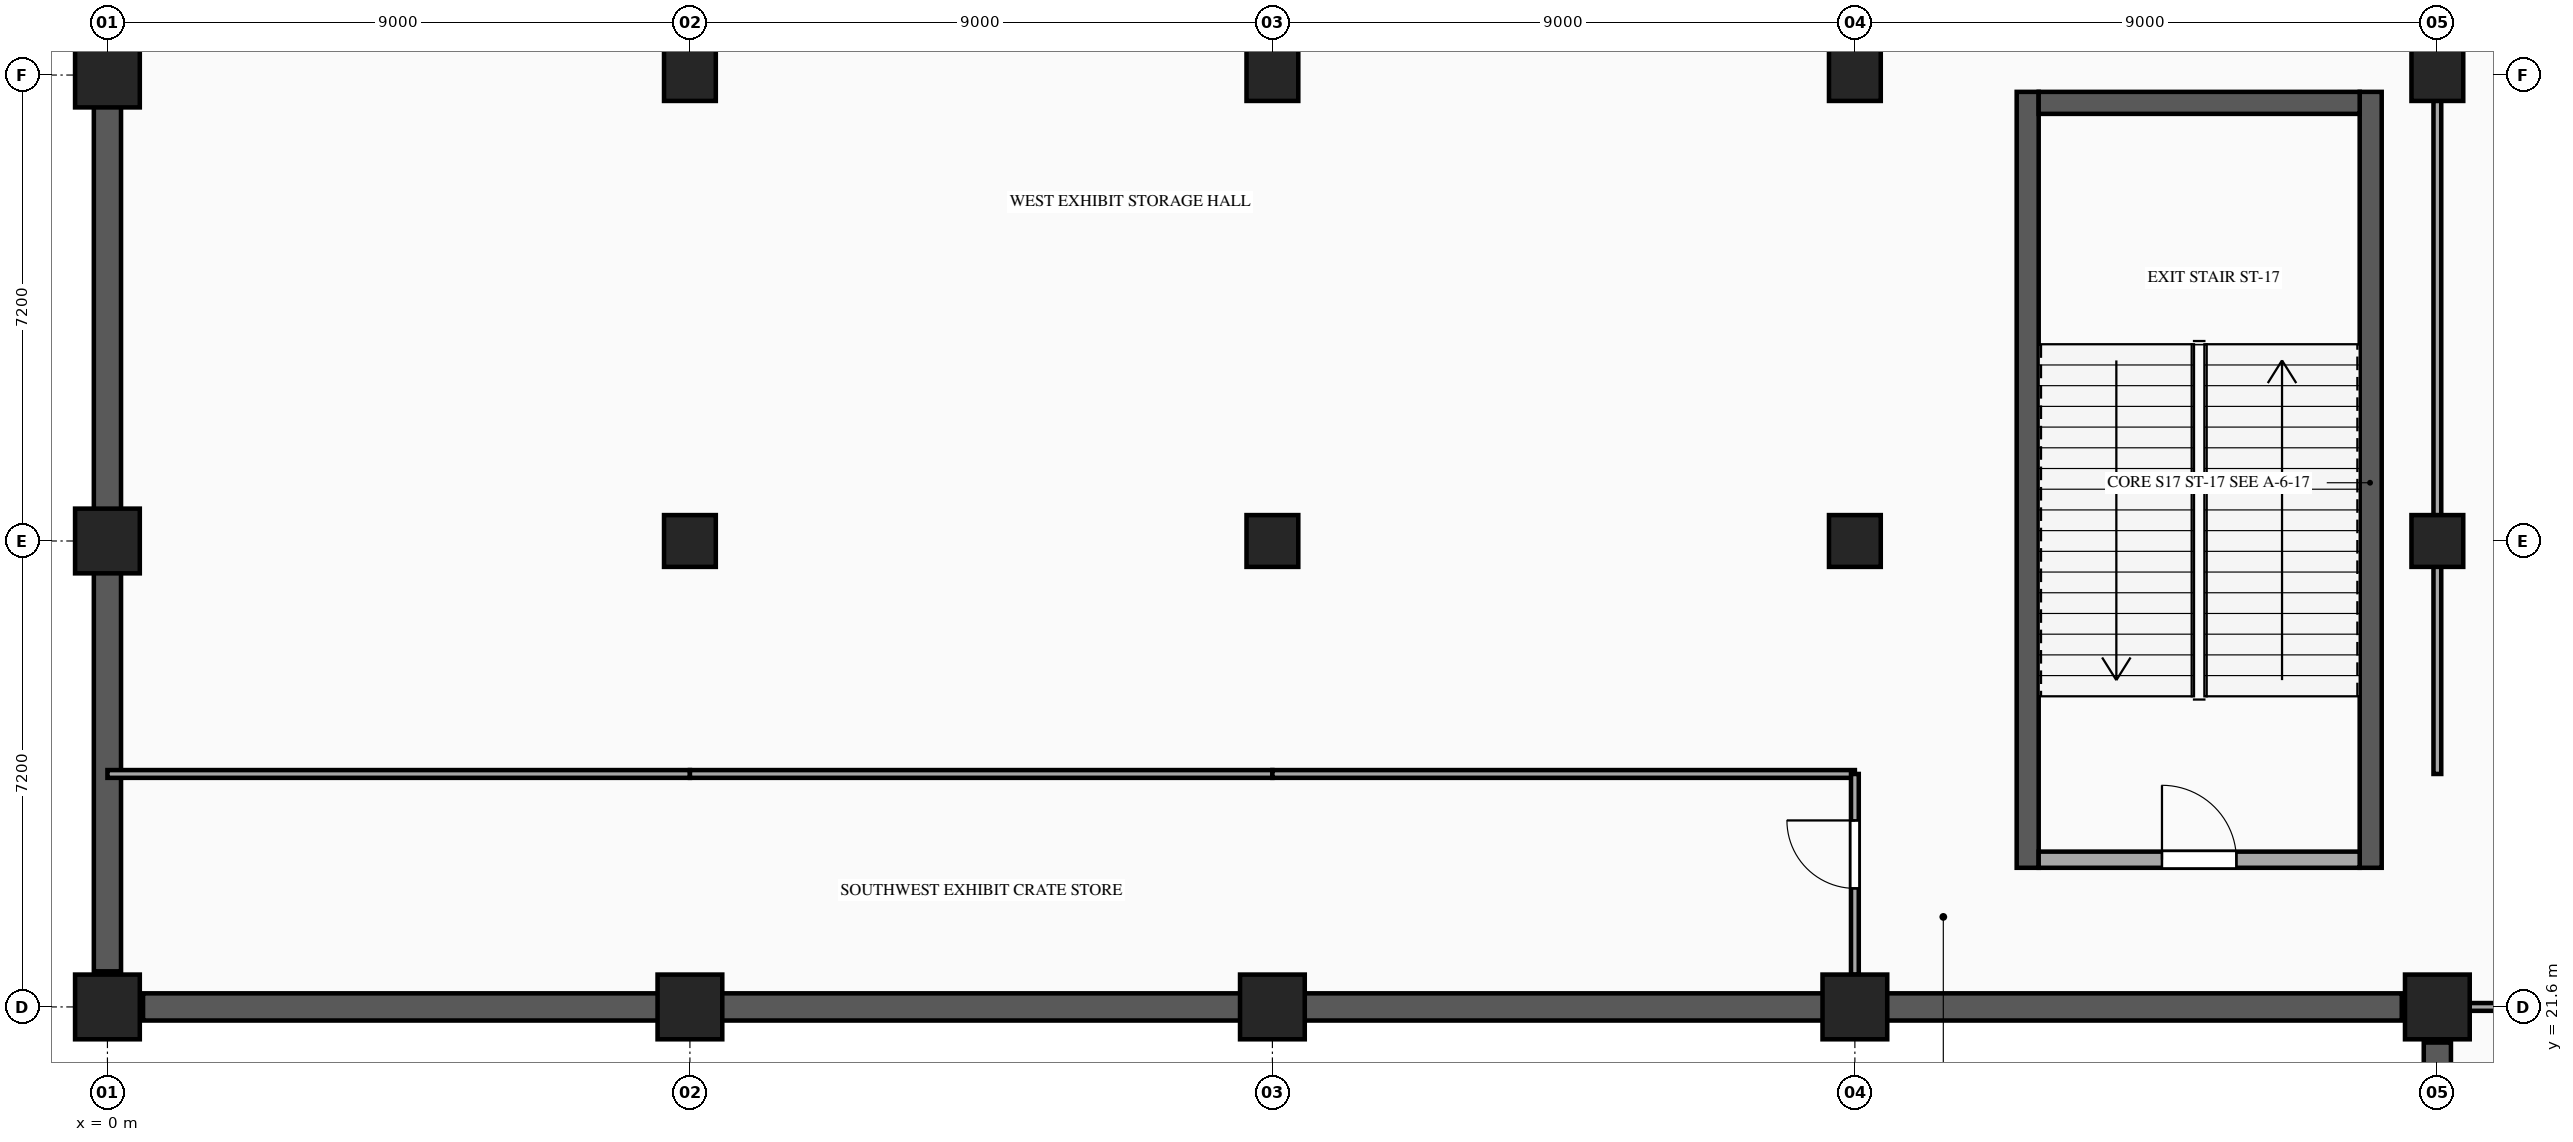
"""IFC4 building model, lengths in metres.
Left out: names, types, materials, properties, quantities, classifications, styles, units other than length and angle.
Written with IfcOpenShell. Run it as: python <this file> out.ifc"""

import sys

from ifc_helpers import new_model, si_unit, direction, frame, frame_2d, origin, origin_2d, place, context, subcontext, project, spatial, rectangle, extrude, element, fill, save


model = new_model("IFC4")
c1 = context("Model", 3, precision=1e-05, world=origin(), true_north=direction((0.0, 1.0)))
c2 = subcontext(c1, "Body", "Model", "MODEL_VIEW")
j1 = project(units=[si_unit("LENGTHUNIT", "METRE"), si_unit("PLANEANGLEUNIT", "RADIAN")], contexts=[c1])
p1 = place(None, origin())
s1 = spatial("IfcSite", under=j1, at=p1, CompositionType="ELEMENT")
p2 = place(p1, origin())
s2 = spatial("IfcBuilding", under=s1, at=p2, CompositionType="ELEMENT")
p3 = place(p2, frame((0.0, 0.0, -5.4)))
s3 = spatial("IfcBuildingStorey", under=s2, at=p3, CompositionType="ELEMENT", Elevation=-5.4)
for number, where, z_axis, x_axis in (
    (1, (0.0, 21.6, 0.0), (0.0, 0.0, 1.0), (1.0, 0.0, 0.0)),
    (2, (0.0, 28.8, 0.0), (0.0, 0.0, 1.0), (1.0, 0.0, 0.0)),
    (3, (0.0, 36.0, 0.0), (0.0, 0.0, 1.0), (1.0, 0.0, 0.0)),
    (4, (9.0, 21.6, 0.0), (0.0, 0.0, 1.0), (1.0, 0.0, 0.0)),
):
    element("IfcColumn", number, at=place(p3, frame(where, z_axis=z_axis, x_axis=x_axis)), inside=s3, PredefinedType="COLUMN", context=c2, shape_type="SweptSolid", body=[
        extrude(rectangle(XDim=1.0, YDim=1.0, at=origin_2d()), origin(), (0.0, 0.0, 1.0), 5.4),
    ])
for number, where, z_axis, x_axis in (
    (5, (9.0, 28.8, 0.0), (0.0, 0.0, 1.0), (1.0, 0.0, 0.0)),
    (6, (9.0, 36.0, 0.0), (0.0, 0.0, 1.0), (1.0, 0.0, 0.0)),
):
    element("IfcColumn", number, at=place(p3, frame(where, z_axis=z_axis, x_axis=x_axis)), inside=s3, PredefinedType="COLUMN", context=c2, shape_type="SweptSolid", body=[
        extrude(rectangle(XDim=0.8, YDim=0.8, at=origin_2d()), origin(), (0.0, 0.0, 1.0), 5.4),
    ])
p4 = place(p3, frame((18.0, 21.6, 0.0), z_axis=(0.0, 0.0, 1.0), x_axis=(1.0, 0.0, 0.0)))
e7 = element("IfcColumn", 7, at=p4, inside=s3, PredefinedType="COLUMN", context=c2, shape_type="SweptSolid", body=[
    extrude(rectangle(XDim=1.0, YDim=1.0, at=origin_2d()), origin(), (0.0, 0.0, 1.0), 5.4),
])
for number, where, z_axis, x_axis in (
    (8, (18.0, 28.8, 0.0), (0.0, 0.0, 1.0), (1.0, 0.0, 0.0)),
    (9, (18.0, 36.0, 0.0), (0.0, 0.0, 1.0), (1.0, 0.0, 0.0)),
):
    element("IfcColumn", number, at=place(p3, frame(where, z_axis=z_axis, x_axis=x_axis)), inside=s3, PredefinedType="COLUMN", context=c2, shape_type="SweptSolid", body=[
        extrude(rectangle(XDim=0.8, YDim=0.8, at=origin_2d()), origin(), (0.0, 0.0, 1.0), 5.4),
    ])
p5 = place(p3, frame((27.0, 21.6, 0.0), z_axis=(0.0, 0.0, 1.0), x_axis=(1.0, 0.0, 0.0)))
e10 = element("IfcColumn", 10, at=p5, inside=s3, PredefinedType="COLUMN", context=c2, shape_type="SweptSolid", body=[
    extrude(rectangle(XDim=1.0, YDim=1.0, at=origin_2d()), origin(), (0.0, 0.0, 1.0), 5.4),
])
for number, where, z_axis, x_axis in (
    (11, (27.0, 28.8, 0.0), (0.0, 0.0, 1.0), (1.0, 0.0, 0.0)),
    (12, (27.0, 36.0, 0.0), (0.0, 0.0, 1.0), (1.0, 0.0, 0.0)),
):
    element("IfcColumn", number, at=place(p3, frame(where, z_axis=z_axis, x_axis=x_axis)), inside=s3, PredefinedType="COLUMN", context=c2, shape_type="SweptSolid", body=[
        extrude(rectangle(XDim=0.8, YDim=0.8, at=origin_2d()), origin(), (0.0, 0.0, 1.0), 5.4),
    ])
p6 = place(p3, frame((36.0, 21.6, 0.0), z_axis=(0.0, 0.0, 1.0), x_axis=(1.0, 0.0, 0.0)))
e13 = element("IfcColumn", 13, at=p6, inside=s3, PredefinedType="COLUMN", context=c2, shape_type="SweptSolid", body=[
    extrude(rectangle(XDim=1.0, YDim=1.0, at=origin_2d()), origin(), (0.0, 0.0, 1.0), 5.4),
])
for number, where, z_axis, x_axis in (
    (14, (36.0, 28.8, 0.0), (0.0, 0.0, 1.0), (1.0, 0.0, 0.0)),
    (15, (36.0, 36.0, 0.0), (0.0, 0.0, 1.0), (1.0, 0.0, 0.0)),
):
    element("IfcColumn", number, at=place(p3, frame(where, z_axis=z_axis, x_axis=x_axis)), inside=s3, PredefinedType="COLUMN", context=c2, shape_type="SweptSolid", body=[
        extrude(rectangle(XDim=0.8, YDim=0.8, at=origin_2d()), origin(), (0.0, 0.0, 1.0), 5.4),
    ])
p7 = place(p3, frame((0.0, 22.15, 0.0), z_axis=(0.0, 0.0, 1.0), x_axis=(0.0, 1.0, 0.0)))
e16 = element("IfcWall", 16, at=p7, inside=s3, PredefinedType="USERDEFINED", context=c2, shape_type="SweptSolid", body=[
    extrude(rectangle(XDim=85.3, YDim=0.42, at=frame_2d((42.65, 0.0))), origin(), (0.0, 0.0, 1.0), 4.08),
])
p8 = place(p3, frame((36.0, 0.55, 0.0), z_axis=(0.0, 0.0, 1.0), x_axis=(0.0, 1.0, 0.0)))
e17 = element("IfcWall", 17, at=p8, inside=s3, PredefinedType="USERDEFINED", context=c2, shape_type="SweptSolid", body=[
    extrude(rectangle(XDim=20.5, YDim=0.42, at=frame_2d((10.25, 0.0))), origin(), (0.0, 0.0, 1.0), 4.08),
])
p9 = place(p3, frame((35.45, 21.6, 0.0), z_axis=(0.0, 0.0, 1.0), x_axis=(-1.0, 0.0, 0.0)))
e18 = element("IfcWall", 18, at=p9, inside=s3, PredefinedType="USERDEFINED", context=c2, shape_type="SweptSolid", body=[
    extrude(rectangle(XDim=34.9, YDim=0.42, at=frame_2d((17.45, 0.0))), origin(), (0.0, 0.0, 1.0), 4.08),
])
for number, where, z_axis, x_axis in (
    (19, (29.67, 23.75, 0.0), (0.0, 0.0, 1.0), (0.0, 1.0, 0.0)),
    (20, (34.97, 35.74, 0.0), (0.0, 0.0, 1.0), (0.0, -1.0, 0.0)),
):
    element("IfcWall", number, at=place(p3, frame(where, z_axis=z_axis, x_axis=x_axis)), inside=s3, PredefinedType="SHEAR", context=c2, shape_type="SweptSolid", body=[
        extrude(rectangle(XDim=11.99, YDim=0.34, at=frame_2d((5.995, 0.0))), origin(), (0.0, 0.0, 1.0), 5.04),
    ])
p10 = place(p3, frame((29.84, 35.57, 0.0), z_axis=(0.0, 0.0, 1.0), x_axis=(1.0, 0.0, 0.0)))
e21 = element("IfcWall", 21, at=p10, inside=s3, PredefinedType="SHEAR", context=c2, shape_type="SweptSolid", body=[
    extrude(rectangle(XDim=4.96, YDim=0.34, at=frame_2d((2.48, 0.0))), origin(), (0.0, 0.0, 1.0), 5.04),
])
p11 = place(p3, frame((29.84, 23.875, 0.0), z_axis=(0.0, 0.0, 1.0), x_axis=(1.0, 0.0, 0.0)))
e22 = element("IfcWall", 22, at=p11, inside=s3, PredefinedType="STANDARD", context=c2, shape_type="SweptSolid", body=[
    extrude(rectangle(XDim=4.96, YDim=0.25, at=frame_2d((2.48, 0.0))), origin(), (0.0, 0.0, 1.0), 4.95),
])
p12 = place(p11, frame((1.905, 0.0, 0.0)))
e23 = element("IfcOpeningElement", 23, at=p12, cuts=e22, PredefinedType="OPENING", context=c2, shape_type="SweptSolid", body=[
    extrude(rectangle(XDim=1.15, YDim=2.2, at=frame_2d((0.575, 1.1))), frame((0.0, 0.135, 0.0), z_axis=(0.0, -1.0, 0.0), x_axis=(1.0, 0.0, 0.0)), (0.0, 0.0, 1.0), 0.27),
])
p13 = place(p3, frame((36.498, 21.6, 0.0), z_axis=(0.0, 0.0, 1.0), x_axis=(1.0, 0.0, 0.0)))
e24 = element("IfcWall", 24, at=p13, inside=s3, PredefinedType="PARTITIONING", context=c2, shape_type="SweptSolid", body=[
    extrude(rectangle(XDim=8.004, YDim=0.12, at=frame_2d((4.002, 0.0))), origin(), (0.0, 0.0, 1.0), 4.113),
])
p14 = place(p13, frame((3.477, 0.0, 0.0)))
e25 = element("IfcOpeningElement", 25, at=p14, cuts=e24, PredefinedType="OPENING", context=c2, shape_type="SweptSolid", body=[
    extrude(rectangle(XDim=1.05, YDim=2.15, at=frame_2d((0.525, 1.075))), frame((0.0, 0.07, 0.0), z_axis=(0.0, -1.0, 0.0), x_axis=(1.0, 0.0, 0.0)), (0.0, 0.0, 1.0), 0.14),
])
for number, where, z_axis, x_axis in (
    (26, (0.0, 25.2, 0.0), (0.0, 0.0, 1.0), (1.0, 0.0, 0.0)),
    (27, (9.0, 25.2, 0.0), (0.0, 0.0, 1.0), (1.0, 0.0, 0.0)),
    (28, (18.0, 25.2, 0.0), (0.0, 0.0, 1.0), (1.0, 0.0, 0.0)),
):
    element("IfcWall", number, at=place(p3, frame(where, z_axis=z_axis, x_axis=x_axis)), inside=s3, PredefinedType="PARTITIONING", context=c2, shape_type="SweptSolid", body=[
        extrude(rectangle(XDim=9.0, YDim=0.12, at=frame_2d((4.5, 0.0))), origin(), (0.0, 0.0, 1.0), 4.268),
    ])
p15 = place(p3, frame((27.0, 22.098, 0.0), z_axis=(0.0, 0.0, 1.0), x_axis=(0.0, 1.0, 0.0)))
e29 = element("IfcWall", 29, at=p15, inside=s3, PredefinedType="PARTITIONING", context=c2, shape_type="SweptSolid", body=[
    extrude(rectangle(XDim=3.102, YDim=0.12, at=frame_2d((1.551, 0.0))), origin(), (0.0, 0.0, 1.0), 4.268),
])
p16 = place(p15, frame((1.334, 0.0, 0.0)))
e30 = element("IfcOpeningElement", 30, at=p16, cuts=e29, PredefinedType="OPENING", context=c2, shape_type="SweptSolid", body=[
    extrude(rectangle(XDim=1.05, YDim=2.15, at=frame_2d((0.525, 1.075))), frame((0.0, 0.07, 0.0), z_axis=(0.0, -1.0, 0.0), x_axis=(1.0, 0.0, 0.0)), (0.0, 0.0, 1.0), 0.14),
])
p17 = place(p3, frame((36.0, 25.2, 0.0), z_axis=(0.0, 0.0, 1.0), x_axis=(0.0, 1.0, 0.0)))
e31 = element("IfcWall", 31, at=p17, inside=s3, PredefinedType="PARTITIONING", context=c2, shape_type="SweptSolid", body=[
    extrude(rectangle(XDim=3.202, YDim=0.12, at=frame_2d((1.601, 0.0))), origin(), (0.0, 0.0, 1.0), 4.113),
])
p18 = place(p3, frame((36.0, 29.198, 0.0), z_axis=(0.0, 0.0, 1.0), x_axis=(0.0, 1.0, 0.0)))
e32 = element("IfcWall", 32, at=p18, inside=s3, PredefinedType="PARTITIONING", context=c2, shape_type="SweptSolid", body=[
    extrude(rectangle(XDim=6.404, YDim=0.12, at=frame_2d((3.202, 0.0))), origin(), (0.0, 0.0, 1.0), 4.113),
])
p19 = place(p12, origin())
e33 = element("IfcDoor", 33, at=p19, inside=s3, OperationType="SINGLE_SWING_LEFT", PredefinedType="DOOR", context=c2, shape_type="SweptSolid", body=[
    extrude(rectangle(XDim=1.15, YDim=2.2, at=frame_2d((0.575, 1.1))), frame((0.0, 0.025, 0.0), z_axis=(0.0, -1.0, 0.0), x_axis=(1.0, 0.0, 0.0)), (0.0, 0.0, 1.0), 0.05),
])
fill(e23, e33)
p20 = place(p16, origin())
e34 = element("IfcDoor", 34, at=p20, inside=s3, OperationType="SINGLE_SWING_RIGHT", PredefinedType="DOOR", context=c2, shape_type="SweptSolid", body=[
    extrude(rectangle(XDim=1.05, YDim=2.15, at=frame_2d((0.525, 1.075))), frame((0.0, 0.025, 0.0), z_axis=(0.0, -1.0, 0.0), x_axis=(1.0, 0.0, 0.0)), (0.0, 0.0, 1.0), 0.05),
])
fill(e30, e34)
save(model, sys.argv[1])
